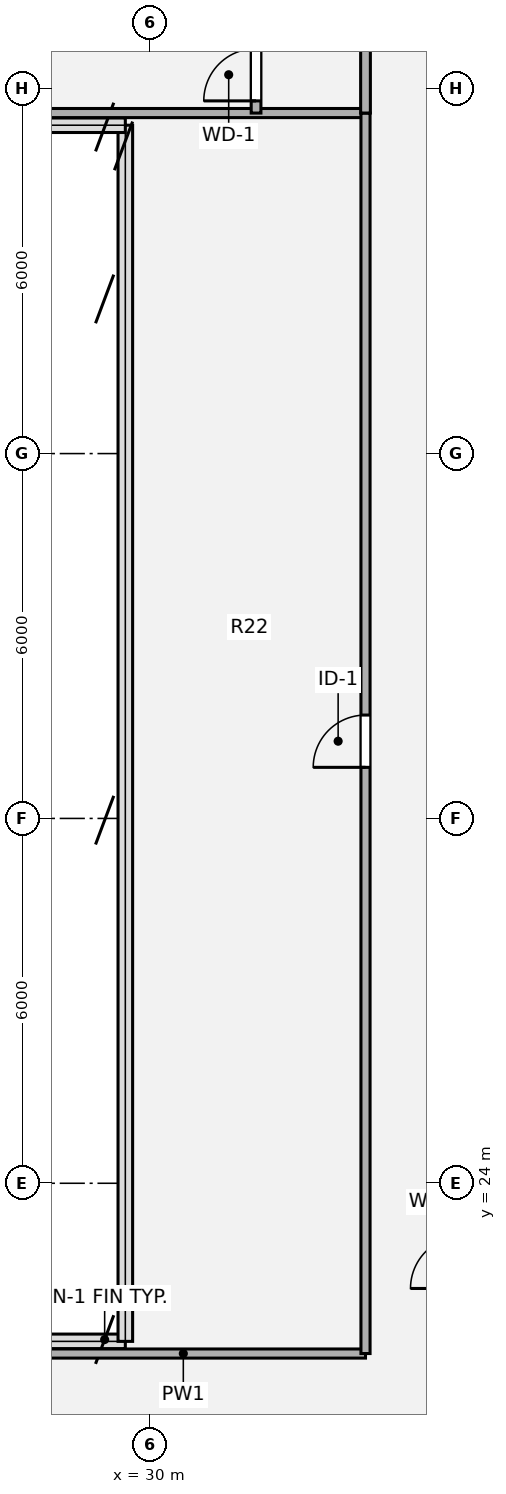
"""IFC4 building model, lengths in metres.
Left out: names, types, materials, properties, quantities, classifications, styles, units other than length and angle.
Written with IfcOpenShell. Run it as: python <this file> out.ifc"""

import sys

from ifc_helpers import new_model, si_unit, direction, frame, frame_2d, origin, origin_2d, place, context, subcontext, project, spatial, rectangle, extrude, source, transform, mapped, element, fill, save


model = new_model("IFC4")
c1 = context("Model", 3, precision=1e-05, world=origin(), true_north=direction((0.0, 1.0)))
c2 = subcontext(c1, "Body", "Model", "MODEL_VIEW")
j1 = project(units=[si_unit("LENGTHUNIT", "METRE"), si_unit("PLANEANGLEUNIT", "RADIAN")], contexts=[c1])
p1 = place(None, origin())
s1 = spatial("IfcSite", under=j1, at=p1, CompositionType="ELEMENT")
p2 = place(p1, origin())
s2 = spatial("IfcBuilding", under=s1, at=p2, CompositionType="ELEMENT")
p3 = place(p2, frame((0.0, 0.0, 230.58)))
s3 = spatial("IfcBuildingStorey", under=s2, at=p3, CompositionType="ELEMENT", Elevation=230.58)
p4 = place(p3, frame((27.558, 21.2, 0.0), z_axis=(0.0, 0.0, 1.0), x_axis=(1.0, 0.0, 0.0)))
e1 = element("IfcWall", 1, at=p4, inside=s3, PredefinedType="PARTITIONING", context=c2, shape_type="SweptSolid", body=[
    extrude(rectangle(XDim=5.992, YDim=0.15, at=frame_2d((2.996, 0.0))), origin(), (0.0, 0.0, 1.0), 3.5),
])
p5 = place(p3, frame((27.558, 41.6, 0.0), z_axis=(0.0, 0.0, 1.0), x_axis=(1.0, 0.0, 0.0)))
e2 = element("IfcWall", 2, at=p5, inside=s3, PredefinedType="PARTITIONING", context=c2, shape_type="SweptSolid", body=[
    extrude(rectangle(XDim=5.992, YDim=0.15, at=frame_2d((2.996, 0.0))), origin(), (0.0, 0.0, 1.0), 3.5),
])
p6 = place(p3, frame((31.75, 41.6, 0.0), z_axis=(0.0, 0.0, 1.0), x_axis=(0.0, 1.0, 0.0)))
e3 = element("IfcWall", 3, at=p6, inside=s3, PredefinedType="PLUMBINGWALL", context=c2, shape_type="SweptSolid", body=[
    extrude(rectangle(XDim=2.4, YDim=0.16, at=frame_2d((1.2, 0.0))), origin(), (0.0, 0.0, 1.0), 3.5),
])
p7 = place(p6, frame((0.2, 0.0, 0.0)))
e4 = element("IfcOpeningElement", 4, at=p7, cuts=e3, PredefinedType="OPENING", context=c2, shape_type="SweptSolid", body=[
    extrude(rectangle(XDim=0.86, YDim=2.1, at=origin_2d()), frame((0.43, 0.09, 1.05), z_axis=(0.0, -1.0, 0.0), x_axis=(1.0, 0.0, 0.0)), (0.0, 0.0, 1.0), 0.18),
])
p8 = place(p3, frame((33.55, 21.2, 0.0), z_axis=(0.0, 0.0, 1.0), x_axis=(0.0, 1.0, 0.0)))
e5 = element("IfcWall", 5, at=p8, inside=s3, PredefinedType="PARTITIONING", context=c2, shape_type="SweptSolid", body=[
    extrude(rectangle(XDim=20.4, YDim=0.15, at=frame_2d((10.2, 0.0))), origin(), (0.0, 0.0, 1.0), 3.5),
])
p9 = place(p8, frame((9.64, 0.0, 0.0)))
e6 = element("IfcOpeningElement", 6, at=p9, cuts=e5, PredefinedType="OPENING", context=c2, shape_type="SweptSolid", body=[
    extrude(rectangle(XDim=0.86, YDim=2.1, at=origin_2d()), frame((0.43, 0.085, 1.05), z_axis=(0.0, -1.0, 0.0), x_axis=(1.0, 0.0, 0.0)), (0.0, 0.0, 1.0), 0.17),
])
p10 = place(p3, frame((33.55, 41.6, 0.0), z_axis=(0.0, 0.0, 1.0), x_axis=(0.0, 1.0, 0.0)))
e7 = element("IfcWall", 7, at=p10, inside=s3, PredefinedType="PLUMBINGWALL", context=c2, shape_type="SweptSolid", body=[
    extrude(rectangle(XDim=2.4, YDim=0.16, at=frame_2d((1.2, 0.0))), origin(), (0.0, 0.0, 1.0), 3.5),
])
m1 = source(origin(), c2, "Body", "SweptSolid", [
    extrude(rectangle(XDim=0.86, YDim=2.1, at=origin_2d()), frame((0.43, 0.025, 1.05), z_axis=(0.0, -1.0, 0.0), x_axis=(1.0, 0.0, 0.0)), (0.0, 0.0, 1.0), 0.05),
])
p11 = place(p7, origin())
e8 = element("IfcDoor", 8, at=p11, inside=s3, OperationType="SINGLE_SWING_LEFT", PredefinedType="DOOR", context=c2, shape_type="MappedRepresentation", body=[
    mapped(m1, transform((0.0, 0.0, 0.0), x_axis=(1.0, 0.0, 0.0), y_axis=(0.0, 1.0, 0.0), z_axis=(0.0, 0.0, 1.0), scale=1.0)),
])
fill(e4, e8)
m2 = source(origin(), c2, "Body", "SweptSolid", [
    extrude(rectangle(XDim=0.86, YDim=2.1, at=origin_2d()), frame((0.43, 0.025, 1.05), z_axis=(0.0, -1.0, 0.0), x_axis=(1.0, 0.0, 0.0)), (0.0, 0.0, 1.0), 0.05),
])
p12 = place(p9, origin())
e9 = element("IfcDoor", 9, at=p12, inside=s3, OperationType="SINGLE_SWING_LEFT", PredefinedType="DOOR", context=c2, shape_type="MappedRepresentation", body=[
    mapped(m2, transform((0.0, 0.0, 0.0), x_axis=(1.0, 0.0, 0.0), y_axis=(0.0, 1.0, 0.0), z_axis=(0.0, 0.0, 1.0), scale=1.0)),
])
fill(e6, e9)
save(model, sys.argv[1])
